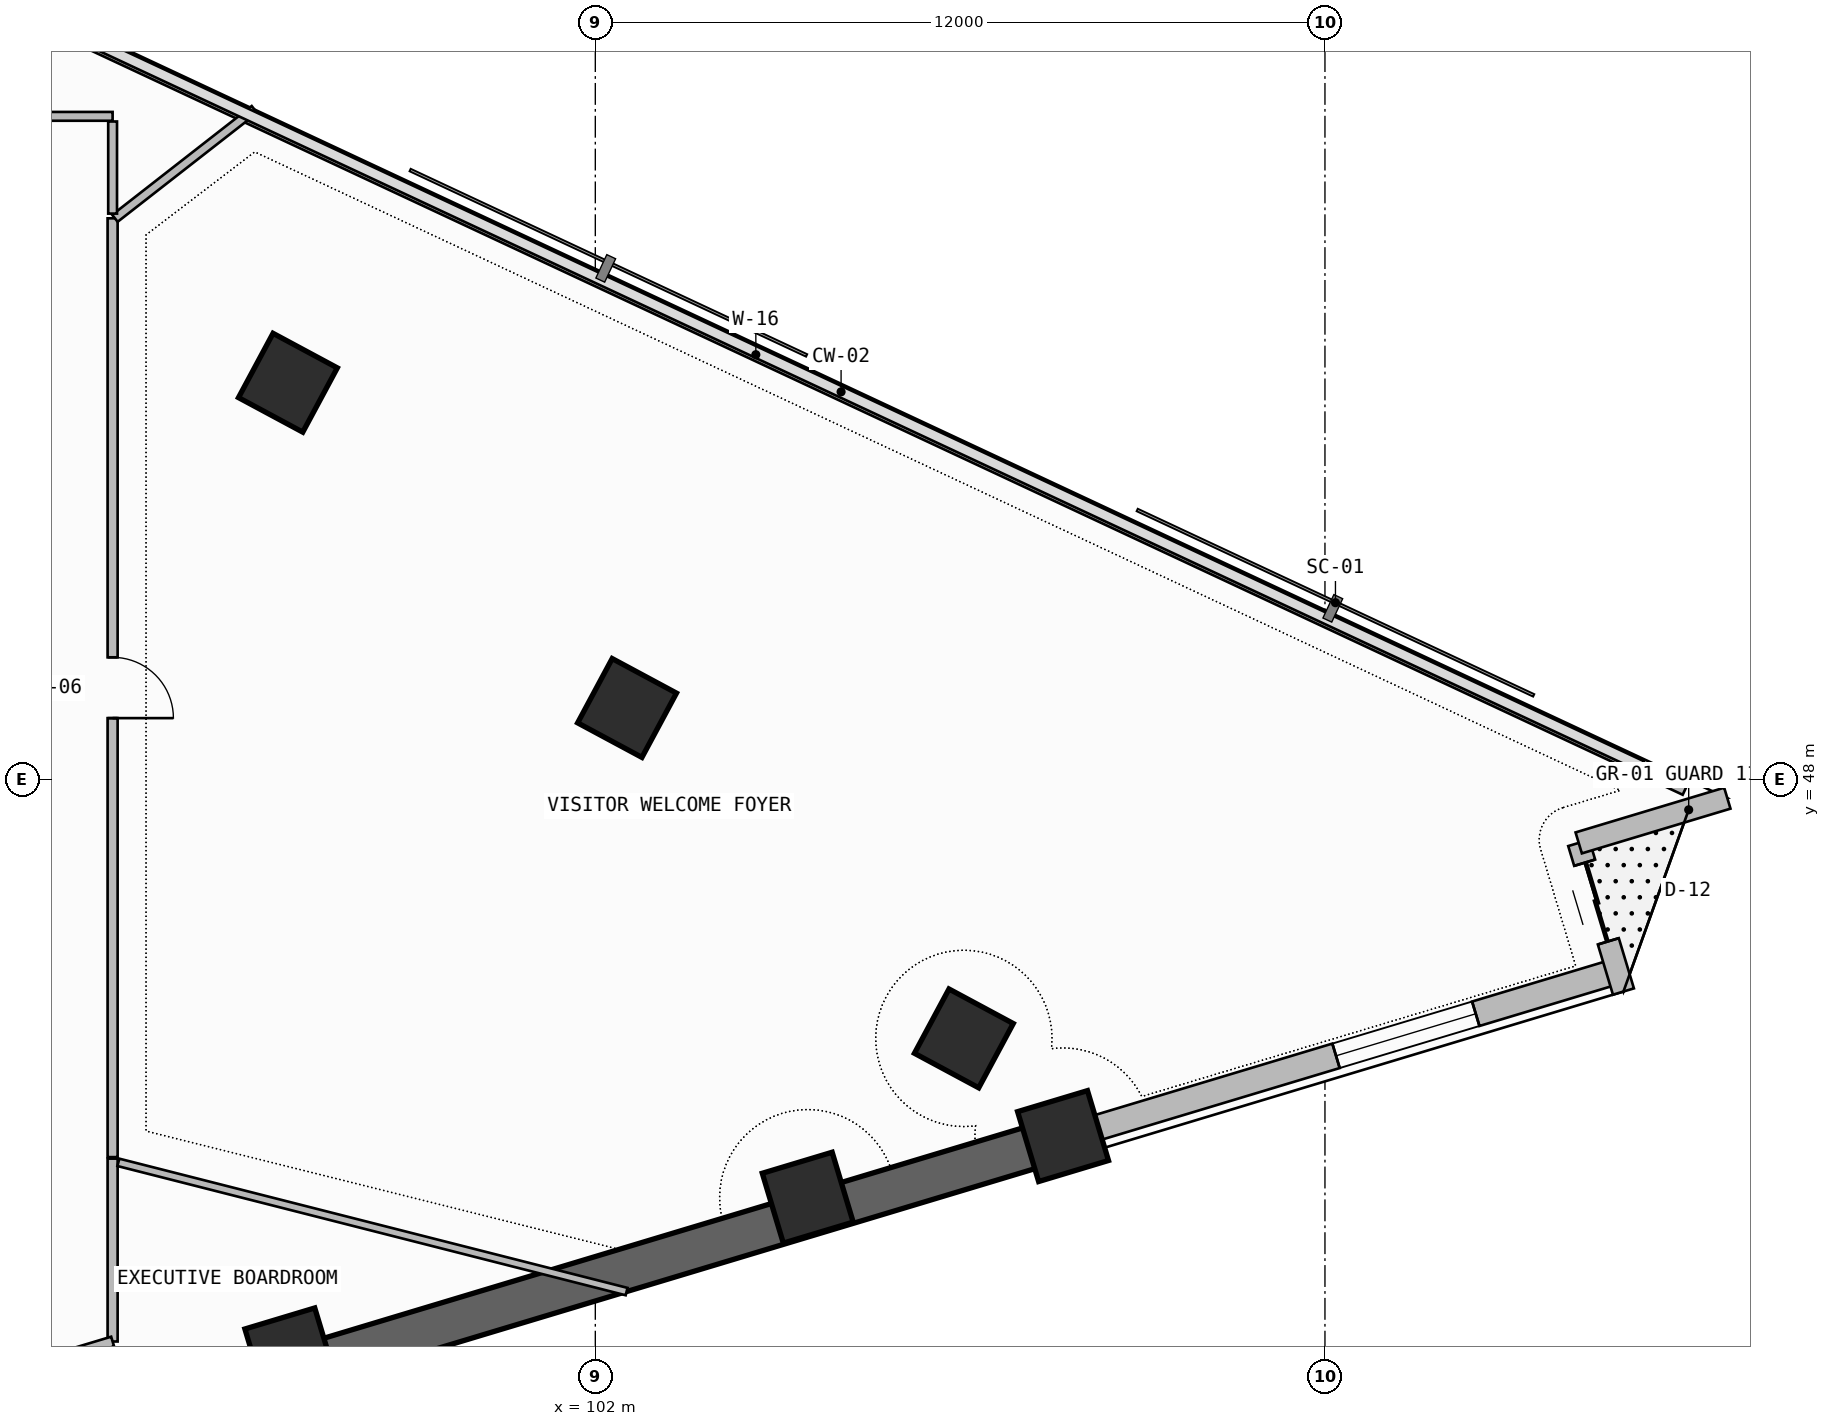
"""IFC4 building model, lengths in metres.
Left out: names, types, materials, properties, quantities, classifications, styles, units other than length and angle.
Written with IfcOpenShell. Run it as: python <this file> out.ifc"""

import sys

from ifc_helpers import new_model, si_unit, direction, frame, frame_2d, origin, origin_2d, place, context, subcontext, project, spatial, rectangle, extrude, element, fill, save


model = new_model("IFC4")
c1 = context("Model", 3, precision=1e-05, world=origin(), true_north=direction((0.0, 1.0)))
c2 = subcontext(c1, "Body", "Model", "MODEL_VIEW")
j1 = project(units=[si_unit("LENGTHUNIT", "METRE"), si_unit("PLANEANGLEUNIT", "RADIAN")], contexts=[c1])
p1 = place(None, origin())
s1 = spatial("IfcSite", under=j1, at=p1, CompositionType="ELEMENT")
p2 = place(p1, origin())
s2 = spatial("IfcBuilding", under=s1, at=p2, CompositionType="ELEMENT")
p3 = place(p2, frame((0.0, 0.0, 135.9)))
s3 = spatial("IfcBuildingStorey", under=s2, at=p3, CompositionType="ELEMENT", Elevation=135.9)
for number, where, z_axis, x_axis in (
    (1, (96.985, 38.565, 0.0), (0.0, 0.0, 1.0), (0.958, 0.288, 0.0)),
    (2, (105.494, 41.126, 0.0), (0.0, 0.0, 1.0), (0.958, 0.288, 0.0)),
    (3, (109.693, 42.139, 0.0), (0.0, 0.0, 1.0), (0.958, 0.288, 0.0)),
    (4, (108.061, 43.746, 0.0), (0.0, 0.0, 1.0), (0.473, 0.881, 0.0)),
    (5, (102.522, 49.179, 0.0), (0.0, 0.0, 1.0), (0.473, 0.881, 0.0)),
    (6, (96.944, 54.528, 0.0), (0.0, 0.0, 1.0), (0.473, 0.881, 0.0)),
):
    element("IfcColumn", number, at=place(p3, frame(where, z_axis=z_axis, x_axis=x_axis)), inside=s3, PredefinedType="COLUMN", context=c2, shape_type="SweptSolid", body=[
        extrude(rectangle(XDim=1.2, YDim=1.2, at=origin_2d()), origin(), (0.0, 0.0, 1.0), 3.6),
    ])
p4 = place(p3, frame((97.062, 38.307, -0.26), z_axis=(0.0, 0.0, 1.0), x_axis=(0.957569832102, 0.288201347408, 0.0)))
e7 = element("IfcWall", 7, at=p4, inside=s3, PredefinedType="SHEAR", context=c2, shape_type="SweptSolid", body=[
    extrude(rectangle(XDim=13.199, YDim=0.7, at=frame_2d((6.6, 0.0))), origin(), (0.0, 0.0, 1.0), 3.6),
])
p5 = place(p3, frame((109.701, 42.111, 0.0), z_axis=(0.0, 0.0, 1.0), x_axis=(0.957575807765, 0.288181492091, 0.0)))
e8 = element("IfcWall", 8, at=p5, inside=s3, PredefinedType="SOLIDWALL", context=c2, shape_type="SweptSolid", body=[
    extrude(rectangle(XDim=9.51, YDim=0.42, at=frame_2d((4.755, 0.0))), origin(), (0.0, 0.0, 1.0), 2.325),
])
p6 = place(p5, frame((4.679, 0.0, 1.2)))
e9 = element("IfcOpeningElement", 9, at=p6, cuts=e8, PredefinedType="OPENING", context=c2, shape_type="SweptSolid", body=[
    extrude(rectangle(XDim=2.4, YDim=0.9, at=frame_2d((1.2, 0.45))), frame((0.0, 0.22, 0.0), z_axis=(0.0, -1.0, 0.0), x_axis=(1.0, 0.0, 0.0)), (0.0, 0.0, 1.0), 0.44),
])
p7 = place(p3, frame((118.909, 44.516, 0.0), z_axis=(0.0, 0.0, 1.0), x_axis=(-0.288172590882, 0.95757848653, 0.0)))
e10 = element("IfcWall", 10, at=p7, inside=s3, PredefinedType="SOLIDWALL", context=c2, shape_type="SweptSolid", body=[
    extrude(rectangle(XDim=2.553, YDim=0.36, at=frame_2d((1.276, 0.0))), origin(), (0.0, 0.0, 1.0), 3.34),
])
p8 = place(p7, frame((0.863, 0.0, 0.0)))
e11 = element("IfcOpeningElement", 11, at=p8, cuts=e10, PredefinedType="OPENING", context=c2, shape_type="SweptSolid", body=[
    extrude(rectangle(XDim=1.35, YDim=2.35, at=frame_2d((0.675, 1.175))), frame((0.0, 0.19, 0.0), z_axis=(0.0, -1.0, 0.0), x_axis=(1.0, 0.0, 0.0)), (0.0, 0.0, 1.0), 0.38),
])
p9 = place(p3, frame((118.173, 46.96, 0.0), z_axis=(0.0, 0.0, 1.0), x_axis=(0.95757848653, 0.288172590882, 0.0)))
e12 = element("IfcWall", 12, at=p9, inside=s3, PredefinedType="SOLIDWALL", context=c2, shape_type="SweptSolid", body=[
    extrude(rectangle(XDim=2.553, YDim=0.36, at=frame_2d((1.276, 0.0))), origin(), (0.0, 0.0, 1.0), 3.34),
])
p10 = place(p3, frame((119.926, 47.843, 0.0), z_axis=(0.0, 0.0, 1.0), x_axis=(-0.905880730846, 0.423532881228, 0.0)))
e13 = element("IfcWall", 13, at=p10, inside=s3, PredefinedType="PARAPET", context=c2, shape_type="SweptSolid", body=[
    extrude(rectangle(XDim=33.748, YDim=0.2, at=frame_2d((16.874, 0.0))), origin(), (0.0, 0.0, 1.0), 1.15),
])
p11 = place(p3, frame((94.061, 38.761, 0.0), z_axis=(0.0, 0.0, 1.0), x_axis=(0.0, 1.0, 0.0)))
e14 = element("IfcWall", 14, at=p11, inside=s3, PredefinedType="PARTITIONING", context=c2, shape_type="SweptSolid", body=[
    extrude(rectangle(XDim=3.007, YDim=0.165, at=frame_2d((1.504, 0.0))), origin(), (0.0, 0.0, 1.0), 3.34),
])
p12 = place(p3, frame((92.056, 38.157, 0.0), z_axis=(0.0, 0.0, 1.0), x_axis=(0.957575652527, 0.288182007919, 0.0)))
e15 = element("IfcWall", 15, at=p12, inside=s3, PredefinedType="PARTITIONING", context=c2, shape_type="SweptSolid", body=[
    extrude(rectangle(XDim=2.094, YDim=0.165, at=frame_2d((1.047, 0.0))), origin(), (0.0, 0.0, 1.0), 3.34),
])
p13 = place(p3, frame((94.156, 41.707, 0.0), z_axis=(0.0, 0.0, 1.0), x_axis=(0.969165666748, -0.246410045243, 0.0)))
e16 = element("IfcWall", 16, at=p13, inside=s3, PredefinedType="PARTITIONING", context=c2, shape_type="SweptSolid", body=[
    extrude(rectangle(XDim=8.625, YDim=0.125, at=frame_2d((4.312, 0.0))), origin(), (0.0, 0.0, 1.0), 2.325),
])
p14 = place(p3, frame((94.061, 41.793, 0.0), z_axis=(0.0, 0.0, 1.0), x_axis=(0.0, 1.0, 0.0)))
e17 = element("IfcWall", 17, at=p14, inside=s3, PredefinedType="PARTITIONING", context=c2, shape_type="SweptSolid", body=[
    extrude(rectangle(XDim=15.439, YDim=0.165, at=frame_2d((7.719, 0.0))), origin(), (0.0, 0.0, 1.0), 2.725),
])
p15 = place(p14, frame((7.219, 0.0, 0.0)))
e18 = element("IfcOpeningElement", 18, at=p15, cuts=e17, PredefinedType="OPENING", context=c2, shape_type="SweptSolid", body=[
    extrude(rectangle(XDim=1.0, YDim=2.2, at=frame_2d((0.5, 1.1))), frame((0.0, 0.093, 0.0), z_axis=(0.0, -1.0, 0.0), x_axis=(1.0, 0.0, 0.0)), (0.0, 0.0, 1.0), 0.185),
])
p16 = place(p3, frame((94.099, 57.232, 0.0), z_axis=(0.0, 0.0, 1.0), x_axis=(0.788447778752, 0.615101699056, 0.0)))
e19 = element("IfcWall", 19, at=p16, inside=s3, PredefinedType="PARTITIONING", context=c2, shape_type="SweptSolid", body=[
    extrude(rectangle(XDim=2.91, YDim=0.145, at=frame_2d((1.455, 0.0))), origin(), (0.0, 0.0, 1.0), 2.725),
])
p17 = place(p3, frame((94.061, 58.909, 0.0), z_axis=(0.0, 0.0, 1.0), x_axis=(-1.0, 0.0, 0.0)))
e20 = element("IfcWall", 20, at=p17, inside=s3, PredefinedType="PARTITIONING", context=c2, shape_type="SweptSolid", body=[
    extrude(rectangle(XDim=8.216, YDim=0.145, at=frame_2d((4.108, 0.0))), origin(), (0.0, 0.0, 1.0), 2.725),
])
p18 = place(p17, frame((4.695, 0.0, 0.0)))
e21 = element("IfcOpeningElement", 21, at=p18, cuts=e20, PredefinedType="OPENING", context=c2, shape_type="SweptSolid", body=[
    extrude(rectangle(XDim=0.9, YDim=2.1, at=frame_2d((0.45, 1.05))), frame((0.0, 0.083, 0.0), z_axis=(0.0, -1.0, 0.0), x_axis=(1.0, 0.0, 0.0)), (0.0, 0.0, 1.0), 0.165),
])
p19 = place(p3, frame((94.061, 57.309, 0.0), z_axis=(0.0, 0.0, 1.0), x_axis=(0.0, 1.0, 0.0)))
e22 = element("IfcWall", 22, at=p19, inside=s3, PredefinedType="PARTITIONING", context=c2, shape_type="SweptSolid", body=[
    extrude(rectangle(XDim=1.515, YDim=0.145, at=frame_2d((0.758, 0.0))), origin(), (0.0, 0.0, 1.0), 2.725),
])
p20 = place(p6, origin())
e23 = element("IfcWindow", 23, at=p20, inside=s3, PartitioningType="SINGLE_PANEL", PredefinedType="WINDOW", context=c2, shape_type="SweptSolid", body=[
    extrude(rectangle(XDim=2.4, YDim=0.9, at=frame_2d((1.2, 0.45))), frame((0.0, 0.03, 0.0), z_axis=(0.0, -1.0, 0.0), x_axis=(1.0, 0.0, 0.0)), (0.0, 0.0, 1.0), 0.06),
])
fill(e9, e23)
p21 = place(p8, origin())
e24 = element("IfcDoor", 24, at=p21, inside=s3, OperationType="DOUBLE_DOOR_SLIDING", PredefinedType="DOOR", context=c2, shape_type="SweptSolid", body=[
    extrude(rectangle(XDim=1.35, YDim=2.35, at=frame_2d((0.675, 1.175))), frame((0.0, 0.025, 0.0), z_axis=(0.0, -1.0, 0.0), x_axis=(1.0, 0.0, 0.0)), (0.0, 0.0, 1.0), 0.05),
])
fill(e11, e24)
p22 = place(p15, frame((1.0, 0.0, 0.0), z_axis=(0.0, 0.0, 1.0), x_axis=(-1.0, 0.0, 0.0)))
e25 = element("IfcDoor", 25, at=p22, inside=s3, OperationType="SINGLE_SWING_RIGHT", PredefinedType="DOOR", context=c2, shape_type="SweptSolid", body=[
    extrude(rectangle(XDim=1.0, YDim=2.2, at=frame_2d((0.5, 1.1))), frame((0.0, 0.025, 0.0), z_axis=(0.0, -1.0, 0.0), x_axis=(1.0, 0.0, 0.0)), (0.0, 0.0, 1.0), 0.05),
])
fill(e18, e25)
save(model, sys.argv[1])
